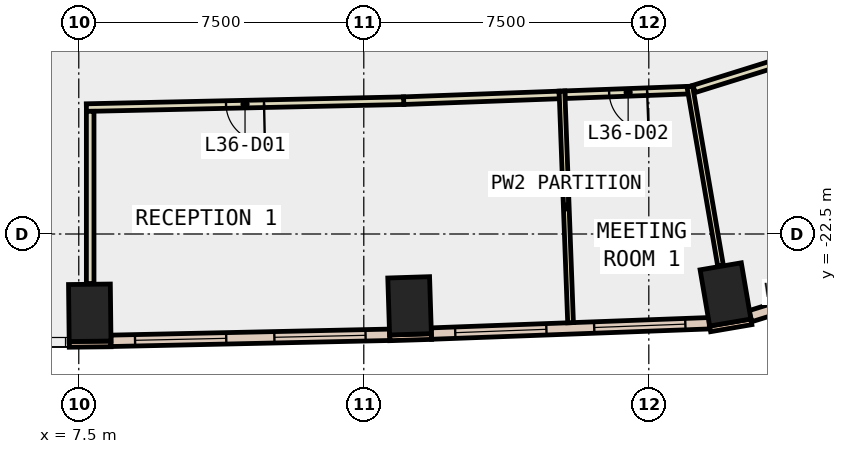
"""IFC4 building model, lengths in metres.
Left out: names, types, materials, properties, quantities, classifications, styles, units other than length and angle.
Written with IfcOpenShell. Run it as: python <this file> out.ifc"""

import sys

from ifc_helpers import new_model, si_unit, direction, frame, frame_2d, origin, origin_2d, place, context, subcontext, project, spatial, rectangle, extrude, element, fill, save


model = new_model("IFC4")
c1 = context("Model", 3, precision=1e-05, world=origin(), true_north=direction((0.0, 1.0)))
c2 = subcontext(c1, "Body", "Model", "MODEL_VIEW")
j1 = project(units=[si_unit("LENGTHUNIT", "METRE"), si_unit("PLANEANGLEUNIT", "RADIAN")], contexts=[c1])
p1 = place(None, origin())
s1 = spatial("IfcSite", under=j1, at=p1, CompositionType="ELEMENT")
p2 = place(p1, origin())
s2 = spatial("IfcBuilding", under=s1, at=p2, CompositionType="ELEMENT")
p3 = place(p2, frame((0.0, 0.0, 163.4)))
s3 = spatial("IfcBuildingStorey", under=s2, at=p3, CompositionType="ELEMENT", Elevation=163.4)
for number, where, z_axis, x_axis in (
    (1, (7.789, -24.573, -0.4), (0.0, 0.0, 1.0), (1.0, 0.012, 0.0)),
    (2, (16.205, -24.39, -0.4), (0.0, 0.0, 1.0), (0.999, 0.032, 0.0)),
    (3, (24.518, -24.09, -0.4), (0.0, 0.0, 1.0), (0.986, 0.168, 0.0)),
):
    element("IfcColumn", number, at=place(p3, frame(where, z_axis=z_axis, x_axis=x_axis)), inside=s3, PredefinedType="COLUMN", context=c2, shape_type="SweptSolid", body=[
        extrude(rectangle(XDim=1.1, YDim=1.5, at=origin_2d()), origin(), (0.0, 0.0, 1.0), 4.2),
    ])
p4 = place(p3, frame((7.249, -25.404, 0.0), z_axis=(0.0, 0.0, 1.0), x_axis=(0.999940879068, 0.010873746799, 0.0)))
e4 = element("IfcWall", 4, at=p4, inside=s3, PredefinedType="STANDARD", context=c2, shape_type="SweptSolid", body=[
    extrude(rectangle(XDim=1.1, YDim=0.15, at=frame_2d((0.55, 0.0))), origin(), (0.0, 0.0, 1.0), 3.8),
])
p5 = place(p3, frame((15.682, -25.232, 0.0), z_axis=(0.0, 0.0, 1.0), x_axis=(0.999523702549, 0.030860460829, 0.0)))
e5 = element("IfcWall", 5, at=p5, inside=s3, PredefinedType="STANDARD", context=c2, shape_type="SweptSolid", body=[
    extrude(rectangle(XDim=1.1, YDim=0.15, at=frame_2d((0.55, 0.0))), origin(), (0.0, 0.0, 1.0), 3.8),
])
p6 = place(p3, frame((24.114, -24.996, 0.0), z_axis=(0.0, 0.0, 1.0), x_axis=(0.985763338892, 0.168138751323, 0.0)))
e6 = element("IfcWall", 6, at=p6, inside=s3, PredefinedType="STANDARD", context=c2, shape_type="SweptSolid", body=[
    extrude(rectangle(XDim=1.101, YDim=0.15, at=frame_2d((0.55, 0.0))), origin(), (0.0, 0.0, 1.0), 3.8),
])
p7 = place(p3, frame((8.347, -25.311, 0.0), z_axis=(0.0, 0.0, 1.0), x_axis=(0.999765201774, 0.021668902196, 0.0)))
e7 = element("IfcWall", 7, at=p7, inside=s3, PredefinedType="STANDARD", context=c2, shape_type="SweptSolid", body=[
    extrude(rectangle(XDim=7.335, YDim=0.3, at=frame_2d((3.667, 0.0))), origin(), (0.0, 0.0, 1.0), 3.8),
])
p8 = place(p7, frame((0.634, 0.0, 0.9)))
e8 = element("IfcOpeningElement", 8, at=p8, cuts=e7, PredefinedType="OPENING", context=c2, shape_type="SweptSolid", body=[
    extrude(rectangle(XDim=2.4, YDim=2.6, at=frame_2d((1.2, 1.3))), frame((0.0, 0.16, 0.0), z_axis=(0.0, -1.0, 0.0), x_axis=(1.0, 0.0, 0.0)), (0.0, 0.0, 1.0), 0.32),
])
p9 = place(p7, frame((4.301, 0.0, 0.9)))
e9 = element("IfcOpeningElement", 9, at=p9, cuts=e7, PredefinedType="OPENING", context=c2, shape_type="SweptSolid", body=[
    extrude(rectangle(XDim=2.4, YDim=2.6, at=frame_2d((1.2, 1.3))), frame((0.0, 0.16, 0.0), z_axis=(0.0, -1.0, 0.0), x_axis=(1.0, 0.0, 0.0)), (0.0, 0.0, 1.0), 0.32),
])
p10 = place(p3, frame((16.778, -25.12, 0.0), z_axis=(0.0, 0.0, 1.0), x_axis=(0.999307730926, 0.037202942236, 0.0)))
e10 = element("IfcWall", 10, at=p10, inside=s3, PredefinedType="STANDARD", context=c2, shape_type="SweptSolid", body=[
    extrude(rectangle(XDim=7.317, YDim=0.3, at=frame_2d((3.659, 0.0))), origin(), (0.0, 0.0, 1.0), 3.8),
])
p11 = place(p10, frame((0.629, 0.0, 0.9)))
e11 = element("IfcOpeningElement", 11, at=p11, cuts=e10, PredefinedType="OPENING", context=c2, shape_type="SweptSolid", body=[
    extrude(rectangle(XDim=2.4, YDim=2.6, at=frame_2d((1.2, 1.3))), frame((0.0, 0.16, 0.0), z_axis=(0.0, -1.0, 0.0), x_axis=(1.0, 0.0, 0.0)), (0.0, 0.0, 1.0), 0.32),
])
p12 = place(p10, frame((4.288, 0.0, 0.9)))
e12 = element("IfcOpeningElement", 12, at=p12, cuts=e10, PredefinedType="OPENING", context=c2, shape_type="SweptSolid", body=[
    extrude(rectangle(XDim=2.4, YDim=2.6, at=frame_2d((1.2, 1.3))), frame((0.0, 0.16, 0.0), z_axis=(0.0, -1.0, 0.0), x_axis=(1.0, 0.0, 0.0)), (0.0, 0.0, 1.0), 0.32),
])
p13 = place(p3, frame((25.172, -24.663, 0.0), z_axis=(0.0, 0.0, 1.0), x_axis=(0.954628614874, 0.29779893832, 0.0)))
e13 = element("IfcWall", 13, at=p13, inside=s3, PredefinedType="STANDARD", context=c2, shape_type="SweptSolid", body=[
    extrude(rectangle(XDim=4.322, YDim=0.3, at=frame_2d((2.161, 0.0))), origin(), (0.0, 0.0, 1.0), 3.8),
])
p14 = place(p13, frame((1.461, 0.0, 0.9)))
e14 = element("IfcOpeningElement", 14, at=p14, cuts=e13, PredefinedType="OPENING", context=c2, shape_type="SweptSolid", body=[
    extrude(rectangle(XDim=1.4, YDim=2.6, at=frame_2d((0.7, 1.3))), frame((0.0, 0.16, 0.0), z_axis=(0.0, -1.0, 0.0), x_axis=(1.0, 0.0, 0.0)), (0.0, 0.0, 1.0), 0.32),
])
p15 = place(p3, frame((20.143, -18.841, 0.0), z_axis=(0.0, 0.0, 1.0), x_axis=(-0.999321592708, -0.036828716339, 0.0)))
e15 = element("IfcWall", 15, at=p15, inside=s3, PredefinedType="PARTITIONING", context=c2, shape_type="SweptSolid", body=[
    extrude(rectangle(XDim=4.097, YDim=0.2, at=frame_2d((2.048, 0.0))), origin(), (0.0, 0.0, 1.0), 3.8),
])
p16 = place(p3, frame((16.049, -18.992, 0.0), z_axis=(0.0, 0.0, 1.0), x_axis=(-0.999762156504, -0.021808952826, 0.0)))
e16 = element("IfcWall", 16, at=p16, inside=s3, PredefinedType="PARTITIONING", context=c2, shape_type="SweptSolid", body=[
    extrude(rectangle(XDim=8.351, YDim=0.2, at=frame_2d((4.176, 0.0))), origin(), (0.0, 0.0, 1.0), 3.8),
])
p17 = place(p16, frame((3.675, 0.0, 0.0)))
e17 = element("IfcOpeningElement", 17, at=p17, cuts=e16, PredefinedType="OPENING", context=c2, shape_type="SweptSolid", body=[
    extrude(rectangle(XDim=1.0, YDim=2.1, at=frame_2d((0.5, 1.05))), frame((0.0, 0.11, 0.0), z_axis=(0.0, -1.0, 0.0), x_axis=(1.0, 0.0, 0.0)), (0.0, 0.0, 1.0), 0.22),
])
p18 = place(p3, frame((23.62, -18.712, 0.0), z_axis=(0.0, 0.0, 1.0), x_axis=(-0.999316841287, -0.03695741767, 0.0)))
e18 = element("IfcWall", 18, at=p18, inside=s3, PredefinedType="PARTITIONING", context=c2, shape_type="SweptSolid", body=[
    extrude(rectangle(XDim=3.329, YDim=0.2, at=frame_2d((1.665, 0.0))), origin(), (0.0, 0.0, 1.0), 3.8),
])
p19 = place(p18, frame((1.165, 0.0, 0.0)))
e19 = element("IfcOpeningElement", 19, at=p19, cuts=e18, PredefinedType="OPENING", context=c2, shape_type="SweptSolid", body=[
    extrude(rectangle(XDim=1.0, YDim=2.1, at=frame_2d((0.5, 1.05))), frame((0.0, 0.11, 0.0), z_axis=(0.0, -1.0, 0.0), x_axis=(1.0, 0.0, 0.0)), (0.0, 0.0, 1.0), 0.22),
])
p20 = place(p3, frame((26.737, -17.732, 0.0), z_axis=(0.0, 0.0, 1.0), x_axis=(-0.954546657381, -0.298061535398, 0.0)))
e20 = element("IfcWall", 20, at=p20, inside=s3, PredefinedType="PARTITIONING", context=c2, shape_type="SweptSolid", body=[
    extrude(rectangle(XDim=3.191, YDim=0.2, at=frame_2d((1.596, 0.0))), origin(), (0.0, 0.0, 1.0), 3.8),
])
p21 = place(p3, frame((7.8, -19.272, 0.0), z_axis=(0.0, 0.0, 1.0), x_axis=(0.0, -1.0, 0.0)))
e21 = element("IfcWall", 21, at=p21, inside=s3, PredefinedType="PARTITIONING", context=c2, shape_type="SweptSolid", body=[
    extrude(rectangle(XDim=4.531, YDim=0.2, at=frame_2d((2.266, 0.0))), origin(), (0.0, 0.0, 1.0), 3.8),
])
p22 = place(p3, frame((20.215, -18.738, 0.0), z_axis=(0.0, 0.0, 1.0), x_axis=(0.037020542149, -0.999314504778, 0.0)))
e22 = element("IfcWall", 22, at=p22, inside=s3, PredefinedType="PARTITIONING", context=c2, shape_type="SweptSolid", body=[
    extrude(rectangle(XDim=6.1, YDim=0.15, at=frame_2d((3.05, 0.0))), origin(), (0.0, 0.0, 1.0), 3.8),
])
p23 = place(p3, frame((23.578, -18.614, 0.0), z_axis=(0.0, 0.0, 1.0), x_axis=(0.169054430835, -0.985606716401, 0.0)))
e23 = element("IfcWall", 23, at=p23, inside=s3, PredefinedType="PARTITIONING", context=c2, shape_type="SweptSolid", body=[
    extrude(rectangle(XDim=4.786, YDim=0.15, at=frame_2d((2.393, 0.0))), origin(), (0.0, 0.0, 1.0), 3.8),
])
p24 = place(p8, origin())
e24 = element("IfcWindow", 24, at=p24, inside=s3, PartitioningType="SINGLE_PANEL", PredefinedType="WINDOW", context=c2, shape_type="SweptSolid", body=[
    extrude(rectangle(XDim=2.4, YDim=2.6, at=frame_2d((1.2, 1.3))), frame((0.0, 0.03, 0.0), z_axis=(0.0, -1.0, 0.0), x_axis=(1.0, 0.0, 0.0)), (0.0, 0.0, 1.0), 0.06),
])
fill(e8, e24)
p25 = place(p9, origin())
e25 = element("IfcWindow", 25, at=p25, inside=s3, PartitioningType="SINGLE_PANEL", PredefinedType="WINDOW", context=c2, shape_type="SweptSolid", body=[
    extrude(rectangle(XDim=2.4, YDim=2.6, at=frame_2d((1.2, 1.3))), frame((0.0, 0.03, 0.0), z_axis=(0.0, -1.0, 0.0), x_axis=(1.0, 0.0, 0.0)), (0.0, 0.0, 1.0), 0.06),
])
fill(e9, e25)
p26 = place(p11, origin())
e26 = element("IfcWindow", 26, at=p26, inside=s3, PartitioningType="SINGLE_PANEL", PredefinedType="WINDOW", context=c2, shape_type="SweptSolid", body=[
    extrude(rectangle(XDim=2.4, YDim=2.6, at=frame_2d((1.2, 1.3))), frame((0.0, 0.03, 0.0), z_axis=(0.0, -1.0, 0.0), x_axis=(1.0, 0.0, 0.0)), (0.0, 0.0, 1.0), 0.06),
])
fill(e11, e26)
p27 = place(p12, origin())
e27 = element("IfcWindow", 27, at=p27, inside=s3, PartitioningType="SINGLE_PANEL", PredefinedType="WINDOW", context=c2, shape_type="SweptSolid", body=[
    extrude(rectangle(XDim=2.4, YDim=2.6, at=frame_2d((1.2, 1.3))), frame((0.0, 0.03, 0.0), z_axis=(0.0, -1.0, 0.0), x_axis=(1.0, 0.0, 0.0)), (0.0, 0.0, 1.0), 0.06),
])
fill(e12, e27)
p28 = place(p17, origin())
e28 = element("IfcDoor", 28, at=p28, inside=s3, OperationType="SINGLE_SWING_RIGHT", PredefinedType="DOOR", context=c2, shape_type="SweptSolid", body=[
    extrude(rectangle(XDim=1.0, YDim=2.1, at=frame_2d((0.5, 1.05))), frame((0.0, 0.025, 0.0), z_axis=(0.0, -1.0, 0.0), x_axis=(1.0, 0.0, 0.0)), (0.0, 0.0, 1.0), 0.05),
])
fill(e17, e28)
p29 = place(p19, origin())
e29 = element("IfcDoor", 29, at=p29, inside=s3, OperationType="SINGLE_SWING_LEFT", PredefinedType="DOOR", context=c2, shape_type="SweptSolid", body=[
    extrude(rectangle(XDim=1.0, YDim=2.1, at=frame_2d((0.5, 1.05))), frame((0.0, 0.025, 0.0), z_axis=(0.0, -1.0, 0.0), x_axis=(1.0, 0.0, 0.0)), (0.0, 0.0, 1.0), 0.05),
])
fill(e19, e29)
save(model, sys.argv[1])
